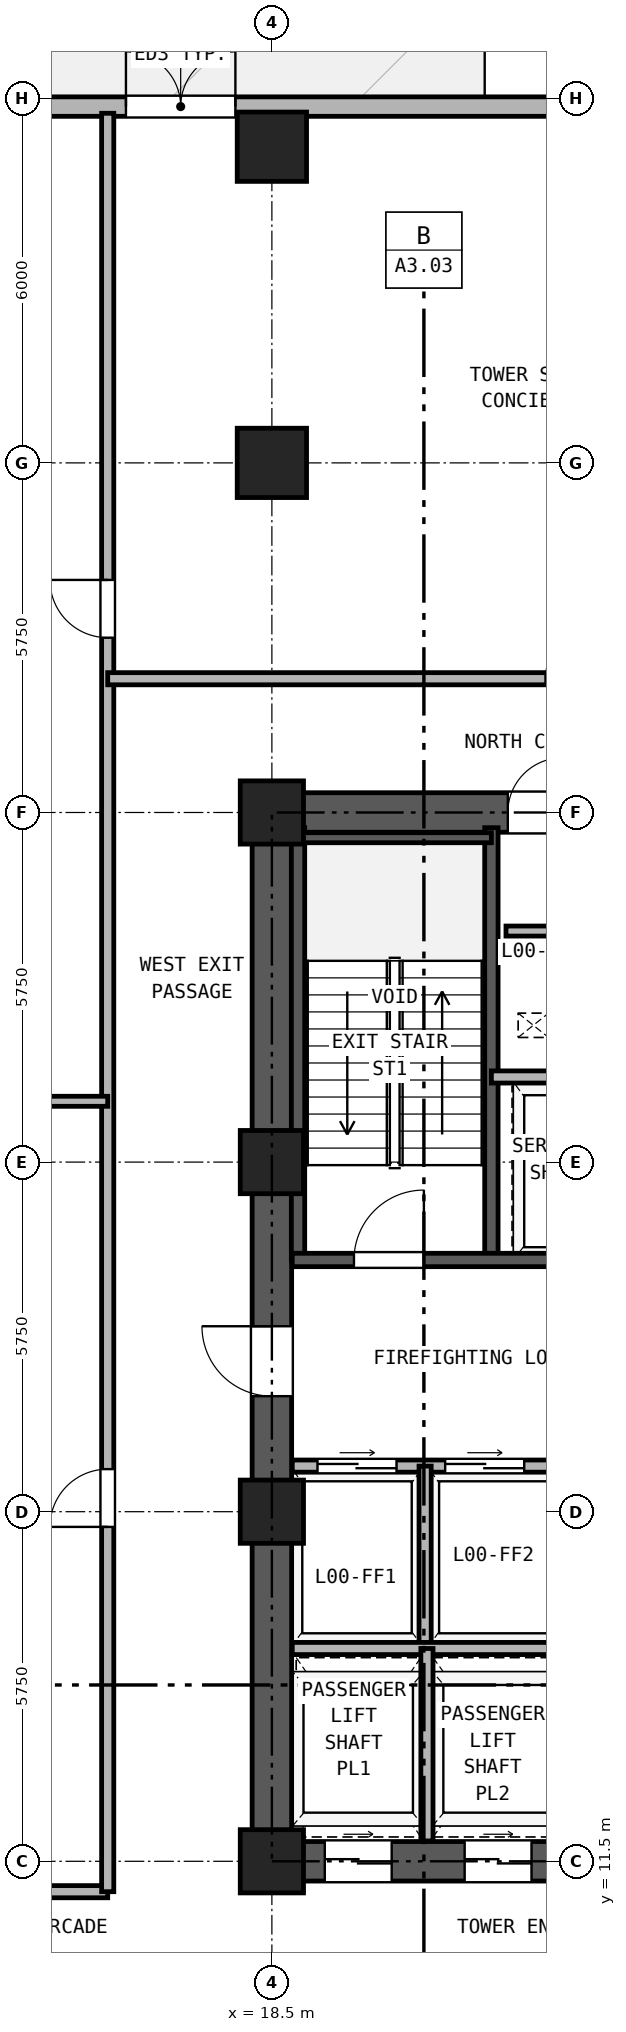
"""IFC4 building model, lengths in metres.
Left out: names, types, materials, properties, quantities, classifications, styles, units other than length and angle.
Written with IfcOpenShell. Run it as: python <this file> out.ifc"""

import sys

from ifc_helpers import new_model, si_unit, direction, frame, frame_2d, origin, origin_2d, place, context, subcontext, project, spatial, rectangle, hollow_rectangle, extrude, source, transform, mapped, element, fill, save


model = new_model("IFC4")
c1 = context("Model", 3, precision=1e-05, world=origin(), true_north=direction((0.0, 1.0)))
c2 = subcontext(c1, "Body", "Model", "MODEL_VIEW")
j1 = project(units=[si_unit("LENGTHUNIT", "METRE"), si_unit("PLANEANGLEUNIT", "RADIAN")], contexts=[c1])
p1 = place(None, origin())
s1 = spatial("IfcSite", under=j1, at=p1, CompositionType="ELEMENT")
p2 = place(p1, origin())
s2 = spatial("IfcBuilding", under=s1, at=p2, CompositionType="ELEMENT")
p3 = place(p2, origin())
s3 = spatial("IfcBuildingStorey", under=s2, at=p3, CompositionType="ELEMENT", Elevation=0.0)
m1 = source(origin(), c2, "Body", "SweptSolid", [
    extrude(hollow_rectangle(XDim=1.14, YDim=1.14, WallThickness=0.07, at=origin_2d()), origin(), (0.0, 0.0, 1.0), 4.18),
])
p4 = place(p3, frame((18.5, 39.7, 0.0), z_axis=(0.0, 0.0, 1.0), x_axis=(1.0, 0.0, 0.0)))
e1 = element("IfcColumn", 1, at=p4, inside=s3, PredefinedType="COLUMN", context=c2, shape_type="MappedRepresentation", body=[
    mapped(m1, transform((0.0, 0.0, 0.0), x_axis=(1.0, 0.0, 0.0), y_axis=(0.0, 1.0, 0.0), z_axis=(0.0, 0.0, 1.0), scale=1.0)),
])
m2 = source(origin(), c2, "Body", "SweptSolid", [
    extrude(hollow_rectangle(XDim=1.04, YDim=1.04, WallThickness=0.065, at=origin_2d()), origin(), (0.0, 0.0, 1.0), 4.18),
])
for number, where, z_axis, x_axis in (
    (2, (18.5, 11.5, 0.0), (0.0, 0.0, 1.0), (1.0, 0.0, 0.0)),
    (3, (18.5, 17.25, 0.0), (0.0, 0.0, 1.0), (1.0, 0.0, 0.0)),
    (4, (18.5, 23.0, 0.0), (0.0, 0.0, 1.0), (1.0, 0.0, 0.0)),
    (5, (18.5, 28.75, 0.0), (0.0, 0.0, 1.0), (1.0, 0.0, 0.0)),
):
    element("IfcColumn", number, at=place(p3, frame(where, z_axis=z_axis, x_axis=x_axis)), inside=s3, PredefinedType="COLUMN", context=c2, shape_type="MappedRepresentation", body=[
        mapped(m2, transform((0.0, 0.0, 0.0), x_axis=(1.0, 0.0, 0.0), y_axis=(0.0, 1.0, 0.0), z_axis=(0.0, 0.0, 1.0), scale=1.0)),
    ])
p5 = place(p3, frame((18.5, 34.5, 0.0), z_axis=(0.0, 0.0, 1.0), x_axis=(1.0, 0.0, 0.0)))
e6 = element("IfcColumn", 6, at=p5, inside=s3, PredefinedType="COLUMN", context=c2, shape_type="MappedRepresentation", body=[
    mapped(m1, transform((0.0, 0.0, 0.0), x_axis=(1.0, 0.0, 0.0), y_axis=(0.0, 1.0, 0.0), z_axis=(0.0, 0.0, 1.0), scale=1.0)),
])
p6 = place(p3, frame((4.0, 40.36, 0.0), z_axis=(0.0, 0.0, 1.0), x_axis=(1.0, 0.0, 0.0)))
e7 = element("IfcWall", 7, at=p6, inside=s3, PredefinedType="SOLIDWALL", context=c2, shape_type="SweptSolid", body=[
    extrude(rectangle(XDim=39.0, YDim=0.32, at=frame_2d((19.5, 0.0))), origin(), (0.0, 0.0, 1.0), 4.18),
])
p7 = place(p6, frame((12.1, 0.0, 0.0)))
e8 = element("IfcOpeningElement", 8, at=p7, cuts=e7, PredefinedType="OPENING", context=c2, shape_type="SweptSolid", body=[
    extrude(rectangle(XDim=1.8, YDim=2.35, at=frame_2d((0.9, 1.175))), frame((0.0, 0.17, 0.0), z_axis=(0.0, -1.0, 0.0), x_axis=(1.0, 0.0, 0.0)), (0.0, 0.0, 1.0), 0.34),
])
p8 = place(p6, frame((25.95, 0.0, 0.0)))
e9 = element("IfcOpeningElement", 9, at=p8, cuts=e7, PredefinedType="OPENING", context=c2, shape_type="SweptSolid", body=[
    extrude(rectangle(XDim=1.8, YDim=2.35, at=frame_2d((0.9, 1.175))), frame((0.0, 0.17, 0.0), z_axis=(0.0, -1.0, 0.0), x_axis=(1.0, 0.0, 0.0)), (0.0, 0.0, 1.0), 0.34),
])
p9 = place(p6, frame((4.2, 0.0, 0.9)))
e10 = element("IfcOpeningElement", 10, at=p9, cuts=e7, PredefinedType="OPENING", context=c2, shape_type="SweptSolid", body=[
    extrude(rectangle(XDim=2.4, YDim=2.1, at=frame_2d((1.2, 1.05))), frame((0.0, 0.17, 0.0), z_axis=(0.0, -1.0, 0.0), x_axis=(1.0, 0.0, 0.0)), (0.0, 0.0, 1.0), 0.34),
])
p10 = place(p6, frame((19.2, 0.0, 0.9)))
e11 = element("IfcOpeningElement", 11, at=p10, cuts=e7, PredefinedType="OPENING", context=c2, shape_type="SweptSolid", body=[
    extrude(rectangle(XDim=2.4, YDim=2.1, at=frame_2d((1.2, 1.05))), frame((0.0, 0.17, 0.0), z_axis=(0.0, -1.0, 0.0), x_axis=(1.0, 0.0, 0.0)), (0.0, 0.0, 1.0), 0.34),
])
p11 = place(p6, frame((31.8, 0.0, 0.9)))
e12 = element("IfcOpeningElement", 12, at=p11, cuts=e7, PredefinedType="OPENING", context=c2, shape_type="SweptSolid", body=[
    extrude(rectangle(XDim=2.4, YDim=2.1, at=frame_2d((1.2, 1.05))), frame((0.0, 0.17, 0.0), z_axis=(0.0, -1.0, 0.0), x_axis=(1.0, 0.0, 0.0)), (0.0, 0.0, 1.0), 0.34),
])
p12 = place(p3, frame((18.175, 11.5, 0.0), z_axis=(0.0, 0.0, 1.0), x_axis=(1.0, 0.0, 0.0)))
e13 = element("IfcWall", 13, at=p12, inside=s3, PredefinedType="SHEAR", context=c2, shape_type="SweptSolid", body=[
    extrude(rectangle(XDim=10.65, YDim=0.65, at=frame_2d((5.325, 0.0))), origin(), (0.0, 0.0, 1.0), 4.18),
])
p13 = place(p12, frame((1.195, 0.0, 0.0)))
e14 = element("IfcOpeningElement", 14, at=p13, cuts=e13, PredefinedType="OPENING", context=c2, shape_type="SweptSolid", body=[
    extrude(rectangle(XDim=1.1, YDim=2.25, at=frame_2d((0.55, 1.125))), frame((0.0, 0.335, 0.0), z_axis=(0.0, -1.0, 0.0), x_axis=(1.0, 0.0, 0.0)), (0.0, 0.0, 1.0), 0.67),
])
p14 = place(p12, frame((3.495, 0.0, 0.0)))
e15 = element("IfcOpeningElement", 15, at=p14, cuts=e13, PredefinedType="OPENING", context=c2, shape_type="SweptSolid", body=[
    extrude(rectangle(XDim=1.1, YDim=2.25, at=frame_2d((0.55, 1.125))), frame((0.0, 0.335, 0.0), z_axis=(0.0, -1.0, 0.0), x_axis=(1.0, 0.0, 0.0)), (0.0, 0.0, 1.0), 0.67),
])
p15 = place(p12, frame((5.925, 0.0, 0.0)))
e16 = element("IfcOpeningElement", 16, at=p15, cuts=e13, PredefinedType="OPENING", context=c2, shape_type="SweptSolid", body=[
    extrude(rectangle(XDim=1.1, YDim=2.25, at=frame_2d((0.55, 1.125))), frame((0.0, 0.335, 0.0), z_axis=(0.0, -1.0, 0.0), x_axis=(1.0, 0.0, 0.0)), (0.0, 0.0, 1.0), 0.67),
])
p16 = place(p12, frame((8.325, 0.0, 0.0)))
e17 = element("IfcOpeningElement", 17, at=p16, cuts=e13, PredefinedType="OPENING", context=c2, shape_type="SweptSolid", body=[
    extrude(rectangle(XDim=1.1, YDim=2.25, at=frame_2d((0.55, 1.125))), frame((0.0, 0.335, 0.0), z_axis=(0.0, -1.0, 0.0), x_axis=(1.0, 0.0, 0.0)), (0.0, 0.0, 1.0), 0.67),
])
p17 = place(p3, frame((18.175, 28.75, 0.0), z_axis=(0.0, 0.0, 1.0), x_axis=(1.0, 0.0, 0.0)))
e18 = element("IfcWall", 18, at=p17, inside=s3, PredefinedType="SHEAR", context=c2, shape_type="SweptSolid", body=[
    extrude(rectangle(XDim=10.65, YDim=0.65, at=frame_2d((5.325, 0.0))), origin(), (0.0, 0.0, 1.0), 4.18),
])
p18 = place(p17, frame((4.205, 0.0, 0.0)))
e19 = element("IfcOpeningElement", 19, at=p18, cuts=e18, PredefinedType="OPENING", context=c2, shape_type="SweptSolid", body=[
    extrude(rectangle(XDim=0.9, YDim=2.05, at=frame_2d((0.45, 1.025))), frame((0.0, 0.335, 0.0), z_axis=(0.0, -1.0, 0.0), x_axis=(1.0, 0.0, 0.0)), (0.0, 0.0, 1.0), 0.67),
])
p19 = place(p17, frame((5.745, 0.0, 0.0)))
e20 = element("IfcOpeningElement", 20, at=p19, cuts=e18, PredefinedType="OPENING", context=c2, shape_type="SweptSolid", body=[
    extrude(rectangle(XDim=0.9, YDim=2.05, at=frame_2d((0.45, 1.025))), frame((0.0, 0.335, 0.0), z_axis=(0.0, -1.0, 0.0), x_axis=(1.0, 0.0, 0.0)), (0.0, 0.0, 1.0), 0.67),
])
p20 = place(p3, frame((18.5, 11.825, 0.0), z_axis=(0.0, 0.0, 1.0), x_axis=(0.0, 1.0, 0.0)))
e21 = element("IfcWall", 21, at=p20, inside=s3, PredefinedType="SHEAR", context=c2, shape_type="SweptSolid", body=[
    extrude(rectangle(XDim=16.6, YDim=0.65, at=frame_2d((8.3, 0.0))), origin(), (0.0, 0.0, 1.0), 4.18),
])
p21 = place(p20, frame((7.325, 0.0, 0.0)))
e22 = element("IfcOpeningElement", 22, at=p21, cuts=e21, PredefinedType="OPENING", context=c2, shape_type="SweptSolid", body=[
    extrude(rectangle(XDim=1.15, YDim=2.2, at=frame_2d((0.575, 1.1))), frame((0.0, 0.335, 0.0), z_axis=(0.0, -1.0, 0.0), x_axis=(1.0, 0.0, 0.0)), (0.0, 0.0, 1.0), 0.67),
])
for number, where, z_axis, x_axis in (
    (23, (18.93, 21.39, 0.0), (0.0, 0.0, 1.0), (0.0, 1.0, 0.0)),
    (24, (22.11, 21.39, 0.0), (0.0, 0.0, 1.0), (0.0, 1.0, 0.0)),
):
    element("IfcWall", number, at=place(p3, frame(where, z_axis=z_axis, x_axis=x_axis)), inside=s3, PredefinedType="SOLIDWALL", context=c2, shape_type="SweptSolid", body=[
        extrude(rectangle(XDim=7.11, YDim=0.22, at=frame_2d((3.555, 0.0))), origin(), (0.0, 0.0, 1.0), 4.18),
    ])
p22 = place(p3, frame((18.835, 28.335, 0.0), z_axis=(0.0, 0.0, 1.0), x_axis=(1.0, 0.0, 0.0)))
e25 = element("IfcWall", 25, at=p22, inside=s3, PredefinedType="PARTITIONING", context=c2, shape_type="SweptSolid", body=[
    extrude(rectangle(XDim=3.275, YDim=0.165, at=frame_2d((1.638, 0.0))), origin(), (0.0, 0.0, 1.0), 4.18),
])
p23 = place(p3, frame((18.835, 21.39, 0.0), z_axis=(0.0, 0.0, 1.0), x_axis=(1.0, 0.0, 0.0)))
e26 = element("IfcWall", 26, at=p23, inside=s3, PredefinedType="SOLIDWALL", context=c2, shape_type="SweptSolid", body=[
    extrude(rectangle(XDim=6.295, YDim=0.22, at=frame_2d((3.147, 0.0))), origin(), (0.0, 0.0, 1.0), 4.18),
])
p24 = place(p23, frame((1.015, 0.0, 0.0)))
e27 = element("IfcOpeningElement", 27, at=p24, cuts=e26, PredefinedType="OPENING", context=c2, shape_type="SweptSolid", body=[
    extrude(rectangle(XDim=1.15, YDim=2.2, at=frame_2d((0.575, 1.1))), frame((0.0, 0.12, 0.0), z_axis=(0.0, -1.0, 0.0), x_axis=(1.0, 0.0, 0.0)), (0.0, 0.0, 1.0), 0.24),
])
p25 = place(p23, frame((4.745, 0.0, 0.0)))
e28 = element("IfcOpeningElement", 28, at=p25, cuts=e26, PredefinedType="OPENING", context=c2, shape_type="SweptSolid", body=[
    extrude(rectangle(XDim=1.1, YDim=2.25, at=frame_2d((0.55, 1.125))), frame((0.0, 0.12, 0.0), z_axis=(0.0, -1.0, 0.0), x_axis=(1.0, 0.0, 0.0)), (0.0, 0.0, 1.0), 0.24),
])
p26 = place(p3, frame((22.11, 24.4, 0.0), z_axis=(0.0, 0.0, 1.0), x_axis=(1.0, 0.0, 0.0)))
e29 = element("IfcWall", 29, at=p26, inside=s3, PredefinedType="PARTITIONING", context=c2, shape_type="SweptSolid", body=[
    extrude(rectangle(XDim=3.02, YDim=0.2, at=frame_2d((1.51, 0.0))), origin(), (0.0, 0.0, 1.0), 4.18),
])
p27 = place(p3, frame((18.835, 18.0, 0.0), z_axis=(0.0, 0.0, 1.0), x_axis=(1.0, 0.0, 0.0)))
e30 = element("IfcWall", 30, at=p27, inside=s3, PredefinedType="PARTITIONING", context=c2, shape_type="SweptSolid", body=[
    extrude(rectangle(XDim=9.33, YDim=0.2, at=frame_2d((4.665, 0.0))), origin(), (0.0, 0.0, 1.0), 4.18),
])
p28 = place(p27, frame((0.415, 0.0, 0.0)))
e31 = element("IfcOpeningElement", 31, at=p28, cuts=e30, PredefinedType="OPENING", context=c2, shape_type="SweptSolid", body=[
    extrude(rectangle(XDim=1.3, YDim=2.3, at=frame_2d((0.65, 1.15))), frame((0.0, 0.11, 0.0), z_axis=(0.0, -1.0, 0.0), x_axis=(1.0, 0.0, 0.0)), (0.0, 0.0, 1.0), 0.22),
])
p29 = place(p27, frame((2.515, 0.0, 0.0)))
e32 = element("IfcOpeningElement", 32, at=p29, cuts=e30, PredefinedType="OPENING", context=c2, shape_type="SweptSolid", body=[
    extrude(rectangle(XDim=1.3, YDim=2.3, at=frame_2d((0.65, 1.15))), frame((0.0, 0.11, 0.0), z_axis=(0.0, -1.0, 0.0), x_axis=(1.0, 0.0, 0.0)), (0.0, 0.0, 1.0), 0.22),
])
p30 = place(p27, frame((7.015, 0.0, 0.0)))
e33 = element("IfcOpeningElement", 33, at=p30, cuts=e30, PredefinedType="OPENING", context=c2, shape_type="SweptSolid", body=[
    extrude(rectangle(XDim=1.0, YDim=2.15, at=frame_2d((0.5, 1.075))), frame((0.0, 0.11, 0.0), z_axis=(0.0, -1.0, 0.0), x_axis=(1.0, 0.0, 0.0)), (0.0, 0.0, 1.0), 0.22),
])
p31 = place(p3, frame((21.02, 15.0, 0.0), z_axis=(0.0, 0.0, 1.0), x_axis=(0.0, 1.0, 0.0)))
e34 = element("IfcWall", 34, at=p31, inside=s3, PredefinedType="PARTITIONING", context=c2, shape_type="SweptSolid", body=[
    extrude(rectangle(XDim=3.0, YDim=0.2, at=frame_2d((1.5, 0.0))), origin(), (0.0, 0.0, 1.0), 4.18),
])
p32 = place(p3, frame((18.835, 15.0, 0.0), z_axis=(0.0, 0.0, 1.0), x_axis=(1.0, 0.0, 0.0)))
e35 = element("IfcWall", 35, at=p32, inside=s3, PredefinedType="PARTITIONING", context=c2, shape_type="SweptSolid", body=[
    extrude(rectangle(XDim=9.33, YDim=0.2, at=frame_2d((4.665, 0.0))), origin(), (0.0, 0.0, 1.0), 4.18),
])
p33 = place(p3, frame((21.05, 11.835, 0.0), z_axis=(0.0, 0.0, 1.0), x_axis=(0.0, 1.0, 0.0)))
e36 = element("IfcWall", 36, at=p33, inside=s3, PredefinedType="PARTITIONING", context=c2, shape_type="SweptSolid", body=[
    extrude(rectangle(XDim=3.165, YDim=0.2, at=frame_2d((1.583, 0.0))), origin(), (0.0, 0.0, 1.0), 4.18),
])
p34 = place(p3, frame((8.5, 11.0, 0.0), z_axis=(0.0, 0.0, 1.0), x_axis=(1.0, 0.0, 0.0)))
e37 = element("IfcWall", 37, at=p34, inside=s3, PredefinedType="PARTITIONING", context=c2, shape_type="SweptSolid", body=[
    extrude(rectangle(XDim=7.3, YDim=0.2, at=frame_2d((3.65, 0.0))), origin(), (0.0, 0.0, 1.0), 4.18),
])
p35 = place(p3, frame((15.8, 11.0, 0.0), z_axis=(0.0, 0.0, 1.0), x_axis=(0.0, 1.0, 0.0)))
e38 = element("IfcWall", 38, at=p35, inside=s3, PredefinedType="PARTITIONING", context=c2, shape_type="SweptSolid", body=[
    extrude(rectangle(XDim=29.25, YDim=0.2, at=frame_2d((14.625, 0.0))), origin(), (0.0, 0.0, 1.0), 4.18),
])
p36 = place(p35, frame((6.0, 0.0, 0.0)))
e39 = element("IfcOpeningElement", 39, at=p36, cuts=e38, PredefinedType="OPENING", context=c2, shape_type="SweptSolid", body=[
    extrude(rectangle(XDim=0.95, YDim=2.15, at=frame_2d((0.475, 1.075))), frame((0.0, 0.11, 0.0), z_axis=(0.0, -1.0, 0.0), x_axis=(1.0, 0.0, 0.0)), (0.0, 0.0, 1.0), 0.22),
])
p37 = place(p35, frame((20.625, 0.0, 0.0)))
e40 = element("IfcOpeningElement", 40, at=p37, cuts=e38, PredefinedType="OPENING", context=c2, shape_type="SweptSolid", body=[
    extrude(rectangle(XDim=0.95, YDim=2.15, at=frame_2d((0.475, 1.075))), frame((0.0, 0.11, 0.0), z_axis=(0.0, -1.0, 0.0), x_axis=(1.0, 0.0, 0.0)), (0.0, 0.0, 1.0), 0.22),
])
p38 = place(p3, frame((15.8, 30.95, 0.0), z_axis=(0.0, 0.0, 1.0), x_axis=(1.0, 0.0, 0.0)))
e41 = element("IfcWall", 41, at=p38, inside=s3, PredefinedType="PARTITIONING", context=c2, shape_type="SweptSolid", body=[
    extrude(rectangle(XDim=12.7, YDim=0.2, at=frame_2d((6.35, 0.0))), origin(), (0.0, 0.0, 1.0), 4.18),
])
p39 = place(p38, frame((7.2, 0.0, 0.0)))
e42 = element("IfcOpeningElement", 42, at=p39, cuts=e41, PredefinedType="OPENING", context=c2, shape_type="SweptSolid", body=[
    extrude(rectangle(XDim=0.95, YDim=2.15, at=frame_2d((0.475, 1.075))), frame((0.0, 0.11, 0.0), z_axis=(0.0, -1.0, 0.0), x_axis=(1.0, 0.0, 0.0)), (0.0, 0.0, 1.0), 0.22),
])
p40 = place(p3, frame((0.25, 24.0, 0.0), z_axis=(0.0, 0.0, 1.0), x_axis=(1.0, 0.0, 0.0)))
e43 = element("IfcWall", 43, at=p40, inside=s3, PredefinedType="PARTITIONING", context=c2, shape_type="SweptSolid", body=[
    extrude(rectangle(XDim=15.55, YDim=0.165, at=frame_2d((7.775, 0.0))), origin(), (0.0, 0.0, 1.0), 4.18),
])
p41 = place(p3, frame((22.35, 26.8, 0.0), z_axis=(0.0, 0.0, 1.0), x_axis=(1.0, 0.0, 0.0)))
e44 = element("IfcWall", 44, at=p41, inside=s3, PredefinedType="PARTITIONING", context=c2, shape_type="SweptSolid", body=[
    extrude(rectangle(XDim=1.1, YDim=0.165, at=frame_2d((0.55, 0.0))), origin(), (0.0, 0.0, 1.0), 4.18),
])
p42 = place(p7, origin())
e45 = element("IfcDoor", 45, at=p42, inside=s3, OperationType="DOUBLE_DOOR_SINGLE_SWING", PredefinedType="DOOR", context=c2, shape_type="SweptSolid", body=[
    extrude(rectangle(XDim=1.8, YDim=2.35, at=frame_2d((0.9, 1.175))), frame((0.0, 0.025, 0.0), z_axis=(0.0, -1.0, 0.0), x_axis=(1.0, 0.0, 0.0)), (0.0, 0.0, 1.0), 0.05),
])
fill(e8, e45)
p43 = place(p24, frame((1.15, 0.0, 0.0), z_axis=(0.0, 0.0, 1.0), x_axis=(-1.0, 0.0, 0.0)))
e46 = element("IfcDoor", 46, at=p43, inside=s3, OperationType="SINGLE_SWING_RIGHT", PredefinedType="DOOR", context=c2, shape_type="SweptSolid", body=[
    extrude(rectangle(XDim=1.15, YDim=2.2, at=frame_2d((0.575, 1.1))), frame((0.0, 0.025, 0.0), z_axis=(0.0, -1.0, 0.0), x_axis=(1.0, 0.0, 0.0)), (0.0, 0.0, 1.0), 0.05),
])
fill(e27, e46)
p44 = place(p28, origin())
e47 = element("IfcDoor", 47, at=p44, inside=s3, OperationType="DOUBLE_DOOR_SLIDING", PredefinedType="DOOR", context=c2, shape_type="SweptSolid", body=[
    extrude(rectangle(XDim=1.3, YDim=2.3, at=frame_2d((0.65, 1.15))), frame((0.0, 0.025, 0.0), z_axis=(0.0, -1.0, 0.0), x_axis=(1.0, 0.0, 0.0)), (0.0, 0.0, 1.0), 0.05),
])
fill(e31, e47)
p45 = place(p29, origin())
e48 = element("IfcDoor", 48, at=p45, inside=s3, OperationType="DOUBLE_DOOR_SLIDING", PredefinedType="DOOR", context=c2, shape_type="SweptSolid", body=[
    extrude(rectangle(XDim=1.3, YDim=2.3, at=frame_2d((0.65, 1.15))), frame((0.0, 0.025, 0.0), z_axis=(0.0, -1.0, 0.0), x_axis=(1.0, 0.0, 0.0)), (0.0, 0.0, 1.0), 0.05),
])
fill(e32, e48)
p46 = place(p21, frame((1.15, 0.0, 0.0), z_axis=(0.0, 0.0, 1.0), x_axis=(-1.0, 0.0, 0.0)))
e49 = element("IfcDoor", 49, at=p46, inside=s3, OperationType="SINGLE_SWING_RIGHT", PredefinedType="DOOR", context=c2, shape_type="SweptSolid", body=[
    extrude(rectangle(XDim=1.15, YDim=2.2, at=frame_2d((0.575, 1.1))), frame((0.0, 0.025, 0.0), z_axis=(0.0, -1.0, 0.0), x_axis=(1.0, 0.0, 0.0)), (0.0, 0.0, 1.0), 0.05),
])
fill(e22, e49)
p47 = place(p18, origin())
e50 = element("IfcDoor", 50, at=p47, inside=s3, OperationType="SINGLE_SWING_RIGHT", PredefinedType="DOOR", context=c2, shape_type="SweptSolid", body=[
    extrude(rectangle(XDim=0.9, YDim=2.05, at=frame_2d((0.45, 1.025))), frame((0.0, 0.025, 0.0), z_axis=(0.0, -1.0, 0.0), x_axis=(1.0, 0.0, 0.0)), (0.0, 0.0, 1.0), 0.05),
])
fill(e19, e50)
p48 = place(p13, frame((1.1, 0.0, 0.0), z_axis=(0.0, 0.0, 1.0), x_axis=(-1.0, 0.0, 0.0)))
e51 = element("IfcDoor", 51, at=p48, inside=s3, OperationType="DOUBLE_DOOR_SLIDING", PredefinedType="DOOR", context=c2, shape_type="SweptSolid", body=[
    extrude(rectangle(XDim=1.1, YDim=2.25, at=frame_2d((0.55, 1.125))), frame((0.0, 0.025, 0.0), z_axis=(0.0, -1.0, 0.0), x_axis=(1.0, 0.0, 0.0)), (0.0, 0.0, 1.0), 0.05),
])
fill(e14, e51)
p49 = place(p14, frame((1.1, 0.0, 0.0), z_axis=(0.0, 0.0, 1.0), x_axis=(-1.0, 0.0, 0.0)))
e52 = element("IfcDoor", 52, at=p49, inside=s3, OperationType="DOUBLE_DOOR_SLIDING", PredefinedType="DOOR", context=c2, shape_type="SweptSolid", body=[
    extrude(rectangle(XDim=1.1, YDim=2.25, at=frame_2d((0.55, 1.125))), frame((0.0, 0.025, 0.0), z_axis=(0.0, -1.0, 0.0), x_axis=(1.0, 0.0, 0.0)), (0.0, 0.0, 1.0), 0.05),
])
fill(e15, e52)
p50 = place(p36, frame((0.95, 0.0, 0.0), z_axis=(0.0, 0.0, 1.0), x_axis=(-1.0, 0.0, 0.0)))
e53 = element("IfcDoor", 53, at=p50, inside=s3, OperationType="SINGLE_SWING_LEFT", PredefinedType="DOOR", context=c2, shape_type="SweptSolid", body=[
    extrude(rectangle(XDim=0.95, YDim=2.15, at=frame_2d((0.475, 1.075))), frame((0.0, 0.025, 0.0), z_axis=(0.0, -1.0, 0.0), x_axis=(1.0, 0.0, 0.0)), (0.0, 0.0, 1.0), 0.05),
])
fill(e39, e53)
p51 = place(p37, frame((0.95, 0.0, 0.0), z_axis=(0.0, 0.0, 1.0), x_axis=(-1.0, 0.0, 0.0)))
e54 = element("IfcDoor", 54, at=p51, inside=s3, OperationType="SINGLE_SWING_RIGHT", PredefinedType="DOOR", context=c2, shape_type="SweptSolid", body=[
    extrude(rectangle(XDim=0.95, YDim=2.15, at=frame_2d((0.475, 1.075))), frame((0.0, 0.025, 0.0), z_axis=(0.0, -1.0, 0.0), x_axis=(1.0, 0.0, 0.0)), (0.0, 0.0, 1.0), 0.05),
])
fill(e40, e54)
save(model, sys.argv[1])
